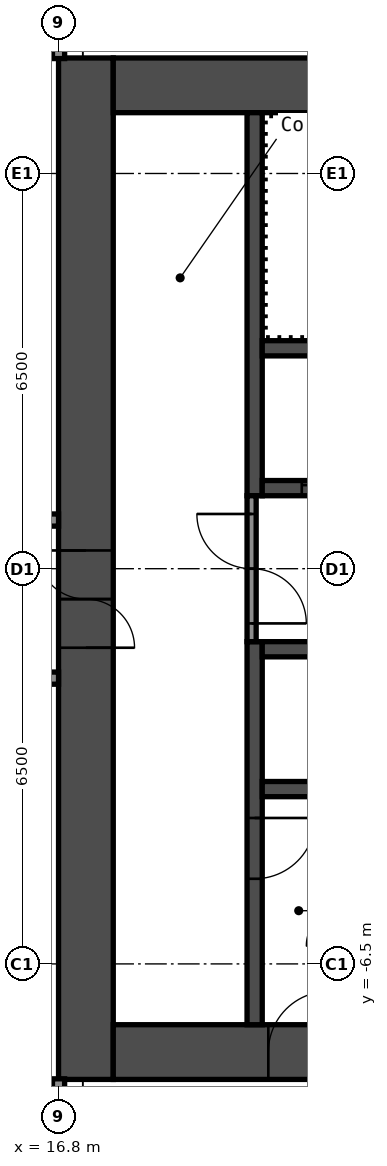
"""IFC4 building model, lengths in metres.
Left out: names, types, materials, properties, quantities, classifications, styles, units other than length and angle.
Written with IfcOpenShell. Run it as: python <this file> out.ifc"""

import sys

from ifc_helpers import new_model, si_unit, direction, frame, frame_2d, origin, place, context, subcontext, project, spatial, rectangle, extrude, element, fill, save


model = new_model("IFC4")
c1 = context("Model", 3, precision=1e-05, world=origin(), true_north=direction((0.0, 1.0)))
c2 = subcontext(c1, "Body", "Model", "MODEL_VIEW")
j1 = project(units=[si_unit("LENGTHUNIT", "METRE"), si_unit("PLANEANGLEUNIT", "RADIAN")], contexts=[c1])
p1 = place(None, origin())
s1 = spatial("IfcSite", under=j1, at=p1, CompositionType="ELEMENT")
p2 = place(p1, origin())
s2 = spatial("IfcBuilding", under=s1, at=p2, CompositionType="ELEMENT")
p3 = place(p2, frame((0.0, 0.0, 120.2)))
s3 = spatial("IfcBuildingStorey", under=s2, at=p3, CompositionType="ELEMENT", Elevation=120.2)
p4 = place(p3, frame((17.25, -8.4, 0.0), z_axis=(0.0, 0.0, 1.0), x_axis=(0.0, 1.0, 0.0)))
e1 = element("IfcWall", 1, at=p4, inside=s3, PredefinedType="SHEAR", context=c2, shape_type="SweptSolid", body=[
    extrude(rectangle(XDim=16.8, YDim=0.9, at=frame_2d((8.4, 0.0))), origin(), (0.0, 0.0, 1.0), 4.1),
])
p5 = place(p4, frame((7.1, 0.0, 0.0)))
e2 = element("IfcOpeningElement", 2, at=p5, cuts=e1, PredefinedType="OPENING", context=c2, shape_type="SweptSolid", body=[
    extrude(rectangle(XDim=1.6, YDim=2.1, at=frame_2d((0.8, 1.05))), frame((0.0, 0.46, 0.0), z_axis=(0.0, -1.0, 0.0), x_axis=(1.0, 0.0, 0.0)), (0.0, 0.0, 1.0), 0.92),
])
p6 = place(p3, frame((17.7, 7.95, 0.0), z_axis=(0.0, 0.0, 1.0), x_axis=(1.0, 0.0, 0.0)))
e3 = element("IfcWall", 3, at=p6, inside=s3, PredefinedType="SHEAR", context=c2, shape_type="SweptSolid", body=[
    extrude(rectangle(XDim=15.0, YDim=0.9, at=frame_2d((7.5, 0.0))), origin(), (0.0, 0.0, 1.0), 4.1),
])
p7 = place(p6, frame((10.4, 0.0, 0.0)))
e4 = element("IfcOpeningElement", 4, at=p7, cuts=e3, PredefinedType="OPENING", context=c2, shape_type="SweptSolid", body=[
    extrude(rectangle(XDim=1.2, YDim=2.1, at=frame_2d((0.6, 1.05))), frame((0.0, 0.46, 0.0), z_axis=(0.0, -1.0, 0.0), x_axis=(1.0, 0.0, 0.0)), (0.0, 0.0, 1.0), 0.92),
])
p8 = place(p6, frame((13.35, 0.0, 0.0)))
e5 = element("IfcOpeningElement", 5, at=p8, cuts=e3, PredefinedType="OPENING", context=c2, shape_type="SweptSolid", body=[
    extrude(rectangle(XDim=0.9, YDim=2.1, at=frame_2d((0.45, 1.05))), frame((0.0, 0.46, 0.0), z_axis=(0.0, -1.0, 0.0), x_axis=(1.0, 0.0, 0.0)), (0.0, 0.0, 1.0), 0.92),
])
p9 = place(p3, frame((17.7, -7.95, 0.0), z_axis=(0.0, 0.0, 1.0), x_axis=(1.0, 0.0, 0.0)))
e6 = element("IfcWall", 6, at=p9, inside=s3, PredefinedType="SHEAR", context=c2, shape_type="SweptSolid", body=[
    extrude(rectangle(XDim=15.0, YDim=0.9, at=frame_2d((7.5, 0.0))), origin(), (0.0, 0.0, 1.0), 4.1),
])
p10 = place(p9, frame((2.55, 0.0, 0.0)))
e7 = element("IfcOpeningElement", 7, at=p10, cuts=e6, PredefinedType="OPENING", context=c2, shape_type="SweptSolid", body=[
    extrude(rectangle(XDim=1.0, YDim=2.1, at=frame_2d((0.5, 1.05))), frame((0.0, 0.46, 0.0), z_axis=(0.0, -1.0, 0.0), x_axis=(1.0, 0.0, 0.0)), (0.0, 0.0, 1.0), 0.92),
])
p11 = place(p3, frame((20.025, 1.2, 0.0), z_axis=(0.0, 0.0, 1.0), x_axis=(0.0, 1.0, 0.0)))
e8 = element("IfcWall", 8, at=p11, inside=s3, PredefinedType="SHEAR", context=c2, shape_type="SweptSolid", body=[
    extrude(rectangle(XDim=6.3, YDim=0.25, at=frame_2d((3.15, 0.0))), origin(), (0.0, 0.0, 1.0), 4.1),
])
p12 = place(p3, frame((20.025, -7.5, 0.0), z_axis=(0.0, 0.0, 1.0), x_axis=(0.0, 1.0, 0.0)))
e9 = element("IfcWall", 9, at=p12, inside=s3, PredefinedType="SHEAR", context=c2, shape_type="SweptSolid", body=[
    extrude(rectangle(XDim=6.3, YDim=0.25, at=frame_2d((3.15, 0.0))), origin(), (0.0, 0.0, 1.0), 4.1),
])
p13 = place(p12, frame((2.4, 0.0, 0.0)))
e10 = element("IfcOpeningElement", 10, at=p13, cuts=e9, PredefinedType="OPENING", context=c2, shape_type="SweptSolid", body=[
    extrude(rectangle(XDim=1.0, YDim=2.1, at=frame_2d((0.5, 1.05))), frame((0.0, 0.135, 0.0), z_axis=(0.0, -1.0, 0.0), x_axis=(1.0, 0.0, 0.0)), (0.0, 0.0, 1.0), 0.27),
])
p14 = place(p3, frame((20.15, 1.325, 0.0), z_axis=(0.0, 0.0, 1.0), x_axis=(1.0, 0.0, 0.0)))
e11 = element("IfcWall", 11, at=p14, inside=s3, PredefinedType="SHEAR", context=c2, shape_type="SweptSolid", body=[
    extrude(rectangle(XDim=7.5, YDim=0.25, at=frame_2d((3.75, 0.0))), origin(), (0.0, 0.0, 1.0), 4.1),
])
p15 = place(p14, frame((0.65, 0.0, 0.0)))
e12 = element("IfcOpeningElement", 12, at=p15, cuts=e11, PredefinedType="OPENING", context=c2, shape_type="SweptSolid", body=[
    extrude(rectangle(XDim=1.1, YDim=2.1, at=frame_2d((0.55, 1.05))), frame((0.0, 0.135, 0.0), z_axis=(0.0, -1.0, 0.0), x_axis=(1.0, 0.0, 0.0)), (0.0, 0.0, 1.0), 0.27),
])
p16 = place(p14, frame((3.05, 0.0, 0.0)))
e13 = element("IfcOpeningElement", 13, at=p16, cuts=e11, PredefinedType="OPENING", context=c2, shape_type="SweptSolid", body=[
    extrude(rectangle(XDim=1.1, YDim=2.1, at=frame_2d((0.55, 1.05))), frame((0.0, 0.135, 0.0), z_axis=(0.0, -1.0, 0.0), x_axis=(1.0, 0.0, 0.0)), (0.0, 0.0, 1.0), 0.27),
])
p17 = place(p14, frame((5.45, 0.0, 0.0)))
e14 = element("IfcOpeningElement", 14, at=p17, cuts=e11, PredefinedType="OPENING", context=c2, shape_type="SweptSolid", body=[
    extrude(rectangle(XDim=1.1, YDim=2.1, at=frame_2d((0.55, 1.05))), frame((0.0, 0.135, 0.0), z_axis=(0.0, -1.0, 0.0), x_axis=(1.0, 0.0, 0.0)), (0.0, 0.0, 1.0), 0.27),
])
for number, where, z_axis, x_axis in (
    (15, (20.15, 3.625, 0.0), (0.0, 0.0, 1.0), (1.0, 0.0, 0.0)),
    (16, (20.15, -1.325, 0.0), (0.0, 0.0, 1.0), (1.0, 0.0, 0.0)),
    (17, (20.15, -3.625, 0.0), (0.0, 0.0, 1.0), (1.0, 0.0, 0.0)),
):
    element("IfcWall", number, at=place(p3, frame(where, z_axis=z_axis, x_axis=x_axis)), inside=s3, PredefinedType="SHEAR", context=c2, shape_type="SweptSolid", body=[
        extrude(rectangle(XDim=7.5, YDim=0.25, at=frame_2d((3.75, 0.0))), origin(), (0.0, 0.0, 1.0), 4.1),
    ])
p18 = place(p3, frame((19.975, -1.2, 0.0), z_axis=(0.0, 0.0, 1.0), x_axis=(0.0, 1.0, 0.0)))
e18 = element("IfcWall", 18, at=p18, inside=s3, PredefinedType="PARTITIONING", context=c2, shape_type="SweptSolid", body=[
    extrude(rectangle(XDim=2.4, YDim=0.15, at=frame_2d((1.2, 0.0))), origin(), (0.0, 0.0, 1.0), 4.1),
])
p19 = place(p18, frame((0.3, 0.0, 0.0)))
e19 = element("IfcOpeningElement", 19, at=p19, cuts=e18, PredefinedType="OPENING", context=c2, shape_type="SweptSolid", body=[
    extrude(rectangle(XDim=1.8, YDim=2.1, at=frame_2d((0.9, 1.05))), frame((0.0, 0.085, 0.0), z_axis=(0.0, -1.0, 0.0), x_axis=(1.0, 0.0, 0.0)), (0.0, 0.0, 1.0), 0.17),
])
p20 = place(p3, frame((-16.8, -1.8, 0.0), z_axis=(0.0, 0.0, 1.0), x_axis=(1.0, 0.0, 0.0)))
e20 = element("IfcWall", 20, at=p20, inside=s3, PredefinedType="PARTITIONING", context=c2, shape_type="SweptSolid", body=[
    extrude(rectangle(XDim=33.6, YDim=0.2, at=frame_2d((16.8, 0.0))), origin(), (0.0, 0.0, 1.0), 4.1),
])
p21 = place(p20, frame((3.4, 0.0, 0.0)))
e21 = element("IfcOpeningElement", 21, at=p21, cuts=e20, PredefinedType="OPENING", context=c2, shape_type="SweptSolid", body=[
    extrude(rectangle(XDim=1.6, YDim=2.1, at=frame_2d((0.8, 1.05))), frame((0.0, 0.11, 0.0), z_axis=(0.0, -1.0, 0.0), x_axis=(1.0, 0.0, 0.0)), (0.0, 0.0, 1.0), 0.22),
])
p22 = place(p20, frame((12.15, 0.0, 0.0)))
e22 = element("IfcOpeningElement", 22, at=p22, cuts=e20, PredefinedType="OPENING", context=c2, shape_type="SweptSolid", body=[
    extrude(rectangle(XDim=0.9, YDim=2.1, at=frame_2d((0.45, 1.05))), frame((0.0, 0.11, 0.0), z_axis=(0.0, -1.0, 0.0), x_axis=(1.0, 0.0, 0.0)), (0.0, 0.0, 1.0), 0.22),
])
p23 = place(p20, frame((20.55, 0.0, 0.0)))
e23 = element("IfcOpeningElement", 23, at=p23, cuts=e20, PredefinedType="OPENING", context=c2, shape_type="SweptSolid", body=[
    extrude(rectangle(XDim=0.9, YDim=2.1, at=frame_2d((0.45, 1.05))), frame((0.0, 0.11, 0.0), z_axis=(0.0, -1.0, 0.0), x_axis=(1.0, 0.0, 0.0)), (0.0, 0.0, 1.0), 0.22),
])
p24 = place(p20, frame((28.6, 0.0, 0.0)))
e24 = element("IfcOpeningElement", 24, at=p24, cuts=e20, PredefinedType="OPENING", context=c2, shape_type="SweptSolid", body=[
    extrude(rectangle(XDim=1.6, YDim=2.1, at=frame_2d((0.8, 1.05))), frame((0.0, 0.11, 0.0), z_axis=(0.0, -1.0, 0.0), x_axis=(1.0, 0.0, 0.0)), (0.0, 0.0, 1.0), 0.22),
])
p25 = place(p3, frame((-16.8, 0.8, 0.0), z_axis=(0.0, 0.0, 1.0), x_axis=(1.0, 0.0, 0.0)))
e25 = element("IfcWall", 25, at=p25, inside=s3, PredefinedType="PARTITIONING", context=c2, shape_type="SweptSolid", body=[
    extrude(rectangle(XDim=33.6, YDim=0.2, at=frame_2d((16.8, 0.0))), origin(), (0.0, 0.0, 1.0), 4.1),
])
p26 = place(p25, frame((3.75, 0.0, 0.0)))
e26 = element("IfcOpeningElement", 26, at=p26, cuts=e25, PredefinedType="OPENING", context=c2, shape_type="SweptSolid", body=[
    extrude(rectangle(XDim=0.9, YDim=2.1, at=frame_2d((0.45, 1.05))), frame((0.0, 0.11, 0.0), z_axis=(0.0, -1.0, 0.0), x_axis=(1.0, 0.0, 0.0)), (0.0, 0.0, 1.0), 0.22),
])
p27 = place(p25, frame((12.15, 0.0, 0.0)))
e27 = element("IfcOpeningElement", 27, at=p27, cuts=e25, PredefinedType="OPENING", context=c2, shape_type="SweptSolid", body=[
    extrude(rectangle(XDim=0.9, YDim=2.1, at=frame_2d((0.45, 1.05))), frame((0.0, 0.11, 0.0), z_axis=(0.0, -1.0, 0.0), x_axis=(1.0, 0.0, 0.0)), (0.0, 0.0, 1.0), 0.22),
])
p28 = place(p25, frame((20.55, 0.0, 0.0)))
e28 = element("IfcOpeningElement", 28, at=p28, cuts=e25, PredefinedType="OPENING", context=c2, shape_type="SweptSolid", body=[
    extrude(rectangle(XDim=0.9, YDim=2.1, at=frame_2d((0.45, 1.05))), frame((0.0, 0.11, 0.0), z_axis=(0.0, -1.0, 0.0), x_axis=(1.0, 0.0, 0.0)), (0.0, 0.0, 1.0), 0.22),
])
p29 = place(p25, frame((28.6, 0.0, 0.0)))
e29 = element("IfcOpeningElement", 29, at=p29, cuts=e25, PredefinedType="OPENING", context=c2, shape_type="SweptSolid", body=[
    extrude(rectangle(XDim=1.6, YDim=2.1, at=frame_2d((0.8, 1.05))), frame((0.0, 0.11, 0.0), z_axis=(0.0, -1.0, 0.0), x_axis=(1.0, 0.0, 0.0)), (0.0, 0.0, 1.0), 0.22),
])
p30 = place(p3, frame((16.8, -19.3, 0.0), z_axis=(0.0, 0.0, 1.0), x_axis=(0.0, 1.0, 0.0)))
e30 = element("IfcWall", 30, at=p30, inside=s3, PredefinedType="PARTITIONING", context=c2, shape_type="SweptSolid", body=[
    extrude(rectangle(XDim=10.91, YDim=0.2, at=frame_2d((5.455, 0.0))), origin(), (0.0, 0.0, 1.0), 4.1),
])
p31 = place(p3, frame((16.8, 8.39, 0.0), z_axis=(0.0, 0.0, 1.0), x_axis=(0.0, 1.0, 0.0)))
e31 = element("IfcWall", 31, at=p31, inside=s3, PredefinedType="PARTITIONING", context=c2, shape_type="SweptSolid", body=[
    extrude(rectangle(XDim=15.16, YDim=0.2, at=frame_2d((7.58, 0.0))), origin(), (0.0, 0.0, 1.0), 4.1),
])
p32 = place(p5, origin())
e32 = element("IfcDoor", 32, at=p32, inside=s3, OperationType="DOUBLE_DOOR_SINGLE_SWING", PredefinedType="DOOR", context=c2, shape_type="SweptSolid", body=[
    extrude(rectangle(XDim=1.6, YDim=2.1, at=frame_2d((0.8, 1.05))), frame((0.0, 0.025, 0.0), z_axis=(0.0, -1.0, 0.0), x_axis=(1.0, 0.0, 0.0)), (0.0, 0.0, 1.0), 0.05),
])
fill(e2, e32)
p33 = place(p10, origin())
e33 = element("IfcDoor", 33, at=p33, inside=s3, OperationType="SINGLE_SWING_LEFT", PredefinedType="DOOR", context=c2, shape_type="SweptSolid", body=[
    extrude(rectangle(XDim=1.0, YDim=2.1, at=frame_2d((0.5, 1.05))), frame((0.0, 0.025, 0.0), z_axis=(0.0, -1.0, 0.0), x_axis=(1.0, 0.0, 0.0)), (0.0, 0.0, 1.0), 0.05),
])
fill(e7, e33)
p34 = place(p13, origin())
e34 = element("IfcDoor", 34, at=p34, inside=s3, OperationType="SINGLE_SWING_RIGHT", PredefinedType="DOOR", context=c2, shape_type="SweptSolid", body=[
    extrude(rectangle(XDim=1.0, YDim=2.1, at=frame_2d((0.5, 1.05))), frame((0.0, 0.025, 0.0), z_axis=(0.0, -1.0, 0.0), x_axis=(1.0, 0.0, 0.0)), (0.0, 0.0, 1.0), 0.05),
])
fill(e10, e34)
p35 = place(p19, origin())
e35 = element("IfcDoor", 35, at=p35, inside=s3, OperationType="DOUBLE_DOOR_SINGLE_SWING", PredefinedType="DOOR", context=c2, shape_type="SweptSolid", body=[
    extrude(rectangle(XDim=1.8, YDim=2.1, at=frame_2d((0.9, 1.05))), frame((0.0, 0.025, 0.0), z_axis=(0.0, -1.0, 0.0), x_axis=(1.0, 0.0, 0.0)), (0.0, 0.0, 1.0), 0.05),
])
fill(e19, e35)
p36 = place(p15, origin())
e36 = element("IfcDoor", 36, at=p36, inside=s3, OperationType="DOUBLE_DOOR_SLIDING", PredefinedType="DOOR", context=c2, shape_type="SweptSolid", body=[
    extrude(rectangle(XDim=1.1, YDim=2.1, at=frame_2d((0.55, 1.05))), frame((0.0, 0.025, 0.0), z_axis=(0.0, -1.0, 0.0), x_axis=(1.0, 0.0, 0.0)), (0.0, 0.0, 1.0), 0.05),
])
fill(e12, e36)
save(model, sys.argv[1])
